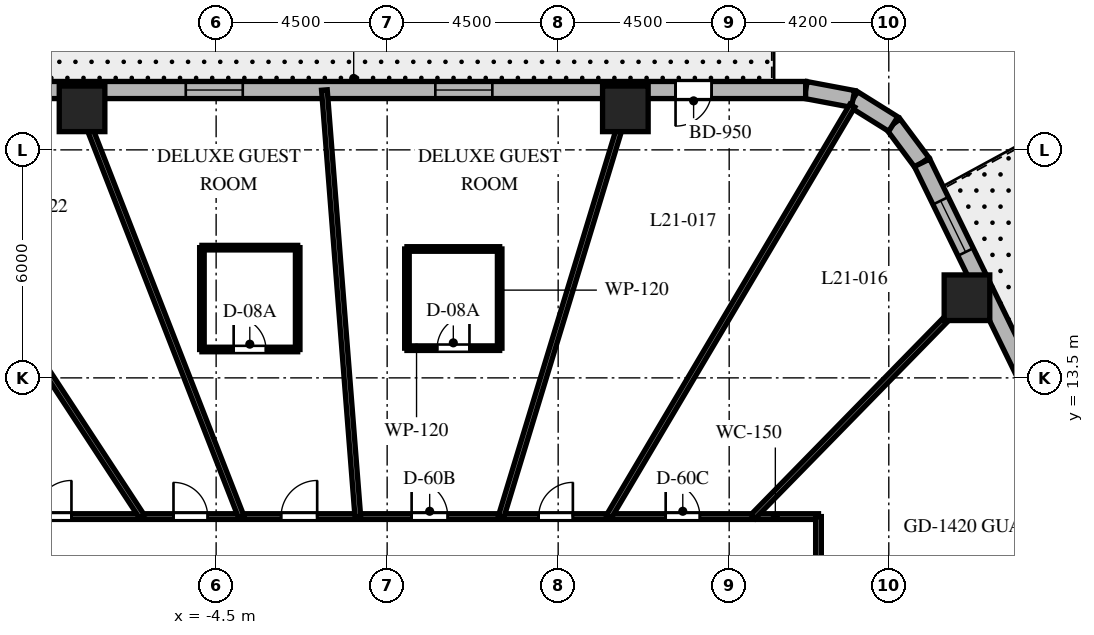
"""IFC4 building model, lengths in metres.
Left out: names, types, materials, properties, quantities, classifications, styles, units other than length and angle.
Written with IfcOpenShell. Run it as: python <this file> out.ifc"""

import sys

from ifc_helpers import new_model, si_unit, direction, frame, frame_2d, origin, origin_2d, place, context, subcontext, project, spatial, rectangle, extrude, element, fill, save


model = new_model("IFC4")
c1 = context("Model", 3, precision=1e-05, world=origin(), true_north=direction((0.0, 1.0)))
c2 = subcontext(c1, "Body", "Model", "MODEL_VIEW")
j1 = project(units=[si_unit("LENGTHUNIT", "METRE"), si_unit("PLANEANGLEUNIT", "RADIAN")], contexts=[c1])
p1 = place(None, origin())
s1 = spatial("IfcSite", under=j1, at=p1, CompositionType="ELEMENT")
p2 = place(p1, origin())
s2 = spatial("IfcBuilding", under=s1, at=p2, CompositionType="ELEMENT")
p3 = place(p2, frame((0.0, 0.0, 91.4)))
s3 = spatial("IfcBuildingStorey", under=s2, at=p3, CompositionType="ELEMENT", Elevation=91.4)
for number, where, z_axis, x_axis in (
    (1, (15.257, 15.609, 0.0), (0.0, 0.0, 1.0), (1.0, 0.0, 0.0)),
    (2, (6.268, 20.58, 0.0), (0.0, 0.0, 1.0), (1.0, 0.0, 0.0)),
    (3, (-8.028, 20.58, 0.0), (0.0, 0.0, 1.0), (1.0, 0.0, 0.0)),
):
    element("IfcColumn", number, at=place(p3, frame(where, z_axis=z_axis, x_axis=x_axis)), inside=s3, PredefinedType="COLUMN", context=c2, shape_type="SweptSolid", body=[
        extrude(rectangle(XDim=1.2, YDim=1.2, at=origin_2d()), origin(), (0.0, 0.0, 1.0), 3.7),
    ])
p4 = place(p3, frame((14.076, 19.161, 0.0), z_axis=(0.0, 0.0, 1.0), x_axis=(-0.597226657159, 0.802072515412, 0.0)))
e4 = element("IfcWall", 4, at=p4, inside=s3, PredefinedType="SOLIDWALL", context=c2, shape_type="SweptSolid", body=[
    extrude(rectangle(XDim=1.269, YDim=0.45, at=frame_2d((0.635, 0.0))), origin(), (0.0, 0.0, 1.0), 3.4),
])
p5 = place(p3, frame((13.318, 20.179, 0.0), z_axis=(0.0, 0.0, 1.0), x_axis=(-0.848031272749, 0.529946186362, 0.0)))
e5 = element("IfcWall", 5, at=p5, inside=s3, PredefinedType="SOLIDWALL", context=c2, shape_type="SweptSolid", body=[
    extrude(rectangle(XDim=1.248, YDim=0.45, at=frame_2d((0.624, 0.0))), origin(), (0.0, 0.0, 1.0), 3.4),
])
p6 = place(p3, frame((12.259, 20.84, 0.0), z_axis=(0.0, 0.0, 1.0), x_axis=(-0.982730354425, 0.185043374624, 0.0)))
e6 = element("IfcWall", 6, at=p6, inside=s3, PredefinedType="SOLIDWALL", context=c2, shape_type="SweptSolid", body=[
    extrude(rectangle(XDim=1.269, YDim=0.45, at=frame_2d((0.635, 0.0))), origin(), (0.0, 0.0, 1.0), 3.4),
])
p7 = place(p3, frame((22.238, 2.427, 0.0), z_axis=(0.0, 0.0, 1.0), x_axis=(-0.438374803278, 0.898792262901, 0.0)))
e7 = element("IfcWall", 7, at=p7, inside=s3, PredefinedType="SOLIDWALL", context=c2, shape_type="SweptSolid", body=[
    extrude(rectangle(XDim=18.618, YDim=0.45, at=frame_2d((9.309, 0.0))), origin(), (0.0, 0.0, 1.0), 3.4),
])
p8 = place(p7, frame((4.62, 0.0, 0.0)))
e8 = element("IfcOpeningElement", 8, at=p8, cuts=e7, PredefinedType="OPENING", context=c2, shape_type="SweptSolid", body=[
    extrude(rectangle(XDim=1.0, YDim=2.15, at=frame_2d((0.5, 1.075))), frame((0.0, 0.235, 0.0), z_axis=(0.0, -1.0, 0.0), x_axis=(1.0, 0.0, 0.0)), (0.0, 0.0, 1.0), 0.47),
])
p9 = place(p7, frame((1.163, 0.0, 0.8)))
e9 = element("IfcOpeningElement", 9, at=p9, cuts=e7, PredefinedType="OPENING", context=c2, shape_type="SweptSolid", body=[
    extrude(rectangle(XDim=1.5, YDim=1.8, at=frame_2d((0.75, 0.9))), frame((0.0, 0.235, 0.0), z_axis=(0.0, -1.0, 0.0), x_axis=(1.0, 0.0, 0.0)), (0.0, 0.0, 1.0), 0.47),
])
p10 = place(p7, frame((8.61, 0.0, 0.8)))
e10 = element("IfcOpeningElement", 10, at=p10, cuts=e7, PredefinedType="OPENING", context=c2, shape_type="SweptSolid", body=[
    extrude(rectangle(XDim=1.5, YDim=1.8, at=frame_2d((0.75, 0.9))), frame((0.0, 0.235, 0.0), z_axis=(0.0, -1.0, 0.0), x_axis=(1.0, 0.0, 0.0)), (0.0, 0.0, 1.0), 0.47),
])
p11 = place(p7, frame((16.006, 0.0, 0.8)))
e11 = element("IfcOpeningElement", 11, at=p11, cuts=e7, PredefinedType="OPENING", context=c2, shape_type="SweptSolid", body=[
    extrude(rectangle(XDim=1.5, YDim=1.8, at=frame_2d((0.75, 0.9))), frame((0.0, 0.235, 0.0), z_axis=(0.0, -1.0, 0.0), x_axis=(1.0, 0.0, 0.0)), (0.0, 0.0, 1.0), 0.47),
])
p12 = place(p3, frame((11.012, 21.075, 0.0), z_axis=(0.0, 0.0, 1.0), x_axis=(-1.0, 0.0, 0.0)))
e12 = element("IfcWall", 12, at=p12, inside=s3, PredefinedType="SOLIDWALL", context=c2, shape_type="SweptSolid", body=[
    extrude(rectangle(XDim=23.782, YDim=0.45, at=frame_2d((11.891, 0.0))), origin(), (0.0, 0.0, 1.0), 3.4),
])
p13 = place(p12, frame((2.473, 0.0, 0.0)))
e13 = element("IfcOpeningElement", 13, at=p13, cuts=e12, PredefinedType="OPENING", context=c2, shape_type="SweptSolid", body=[
    extrude(rectangle(XDim=0.95, YDim=2.15, at=frame_2d((0.475, 1.075))), frame((0.0, 0.235, 0.0), z_axis=(0.0, -1.0, 0.0), x_axis=(1.0, 0.0, 0.0)), (0.0, 0.0, 1.0), 0.47),
])
p14 = place(p12, frame((8.244, 0.0, 0.8)))
e14 = element("IfcOpeningElement", 14, at=p14, cuts=e12, PredefinedType="OPENING", context=c2, shape_type="SweptSolid", body=[
    extrude(rectangle(XDim=1.5, YDim=1.8, at=frame_2d((0.75, 0.9))), frame((0.0, 0.235, 0.0), z_axis=(0.0, -1.0, 0.0), x_axis=(1.0, 0.0, 0.0)), (0.0, 0.0, 1.0), 0.47),
])
p15 = place(p12, frame((14.811, 0.0, 0.8)))
e15 = element("IfcOpeningElement", 15, at=p15, cuts=e12, PredefinedType="OPENING", context=c2, shape_type="SweptSolid", body=[
    extrude(rectangle(XDim=1.5, YDim=1.8, at=frame_2d((0.75, 0.9))), frame((0.0, 0.235, 0.0), z_axis=(0.0, -1.0, 0.0), x_axis=(1.0, 0.0, 0.0)), (0.0, 0.0, 1.0), 0.47),
])
p16 = place(p12, frame((20.741, 0.0, 0.8)))
e16 = element("IfcOpeningElement", 16, at=p16, cuts=e12, PredefinedType="OPENING", context=c2, shape_type="SweptSolid", body=[
    extrude(rectangle(XDim=1.5, YDim=1.8, at=frame_2d((0.75, 0.9))), frame((0.0, 0.235, 0.0), z_axis=(0.0, -1.0, 0.0), x_axis=(1.0, 0.0, 0.0)), (0.0, 0.0, 1.0), 0.47),
])
p17 = place(p3, frame((-11.35, 9.85, 0.0), z_axis=(0.0, 0.0, 1.0), x_axis=(1.0, 0.0, 0.0)))
e17 = element("IfcWall", 17, at=p17, inside=s3, PredefinedType="PARTITIONING", context=c2, shape_type="SweptSolid", body=[
    extrude(rectangle(XDim=22.7, YDim=0.15, at=frame_2d((11.35, 0.0))), origin(), (0.0, 0.0, 1.0), 2.84),
])
p18 = place(p17, frame((18.679, 0.0, 0.0)))
e18 = element("IfcOpeningElement", 18, at=p18, cuts=e17, PredefinedType="OPENING", context=c2, shape_type="SweptSolid", body=[
    extrude(rectangle(XDim=0.9, YDim=2.03, at=frame_2d((0.45, 1.015))), frame((0.0, 0.085, 0.0), z_axis=(0.0, -1.0, 0.0), x_axis=(1.0, 0.0, 0.0)), (0.0, 0.0, 1.0), 0.17),
])
p19 = place(p17, frame((15.337, 0.0, 0.0)))
e19 = element("IfcOpeningElement", 19, at=p19, cuts=e17, PredefinedType="OPENING", context=c2, shape_type="SweptSolid", body=[
    extrude(rectangle(XDim=0.9, YDim=2.03, at=frame_2d((0.45, 1.015))), frame((0.0, 0.085, 0.0), z_axis=(0.0, -1.0, 0.0), x_axis=(1.0, 0.0, 0.0)), (0.0, 0.0, 1.0), 0.17),
])
p20 = place(p17, frame((11.994, 0.0, 0.0)))
e20 = element("IfcOpeningElement", 20, at=p20, cuts=e17, PredefinedType="OPENING", context=c2, shape_type="SweptSolid", body=[
    extrude(rectangle(XDim=0.95, YDim=2.03, at=frame_2d((0.475, 1.015))), frame((0.0, 0.085, 0.0), z_axis=(0.0, -1.0, 0.0), x_axis=(1.0, 0.0, 0.0)), (0.0, 0.0, 1.0), 0.17),
])
p21 = place(p17, frame((8.559, 0.0, 0.0)))
e21 = element("IfcOpeningElement", 21, at=p21, cuts=e17, PredefinedType="OPENING", context=c2, shape_type="SweptSolid", body=[
    extrude(rectangle(XDim=0.95, YDim=2.03, at=frame_2d((0.475, 1.015))), frame((0.0, 0.085, 0.0), z_axis=(0.0, -1.0, 0.0), x_axis=(1.0, 0.0, 0.0)), (0.0, 0.0, 1.0), 0.17),
])
p22 = place(p17, frame((5.728, 0.0, 0.0)))
e22 = element("IfcOpeningElement", 22, at=p22, cuts=e17, PredefinedType="OPENING", context=c2, shape_type="SweptSolid", body=[
    extrude(rectangle(XDim=0.9, YDim=2.03, at=frame_2d((0.45, 1.015))), frame((0.0, 0.085, 0.0), z_axis=(0.0, -1.0, 0.0), x_axis=(1.0, 0.0, 0.0)), (0.0, 0.0, 1.0), 0.17),
])
p23 = place(p17, frame((2.093, 0.0, 0.0)))
e23 = element("IfcOpeningElement", 23, at=p23, cuts=e17, PredefinedType="OPENING", context=c2, shape_type="SweptSolid", body=[
    extrude(rectangle(XDim=0.95, YDim=2.03, at=frame_2d((0.475, 1.015))), frame((0.0, 0.085, 0.0), z_axis=(0.0, -1.0, 0.0), x_axis=(1.0, 0.0, 0.0)), (0.0, 0.0, 1.0), 0.17),
])
p24 = place(p3, frame((11.35, 9.85, 0.0), z_axis=(0.0, 0.0, 1.0), x_axis=(0.0, -1.0, 0.0)))
e24 = element("IfcWall", 24, at=p24, inside=s3, PredefinedType="PARTITIONING", context=c2, shape_type="SweptSolid", body=[
    extrude(rectangle(XDim=19.7, YDim=0.15, at=frame_2d((9.85, 0.0))), origin(), (0.0, 0.0, 1.0), 2.84),
])
p25 = place(p24, frame((7.426, 0.0, 0.0)))
e25 = element("IfcOpeningElement", 25, at=p25, cuts=e24, PredefinedType="OPENING", context=c2, shape_type="SweptSolid", body=[
    extrude(rectangle(XDim=0.9, YDim=2.03, at=frame_2d((0.45, 1.015))), frame((0.0, 0.085, 0.0), z_axis=(0.0, -1.0, 0.0), x_axis=(1.0, 0.0, 0.0)), (0.0, 0.0, 1.0), 0.17),
])
p26 = place(p24, frame((3.008, 0.0, 0.0)))
e26 = element("IfcOpeningElement", 26, at=p26, cuts=e24, PredefinedType="OPENING", context=c2, shape_type="SweptSolid", body=[
    extrude(rectangle(XDim=0.95, YDim=2.03, at=frame_2d((0.475, 1.015))), frame((0.0, 0.085, 0.0), z_axis=(0.0, -1.0, 0.0), x_axis=(1.0, 0.0, 0.0)), (0.0, 0.0, 1.0), 0.17),
])
p27 = place(p24, frame((16.938, 0.0, 0.0)))
e27 = element("IfcOpeningElement", 27, at=p27, cuts=e24, PredefinedType="OPENING", context=c2, shape_type="SweptSolid", body=[
    extrude(rectangle(XDim=0.95, YDim=2.03, at=frame_2d((0.475, 1.015))), frame((0.0, 0.085, 0.0), z_axis=(0.0, -1.0, 0.0), x_axis=(1.0, 0.0, 0.0)), (0.0, 0.0, 1.0), 0.17),
])
p28 = place(p24, frame((13.171, 0.0, 0.0)))
e28 = element("IfcOpeningElement", 28, at=p28, cuts=e24, PredefinedType="OPENING", context=c2, shape_type="SweptSolid", body=[
    extrude(rectangle(XDim=0.95, YDim=2.03, at=frame_2d((0.475, 1.015))), frame((0.0, 0.085, 0.0), z_axis=(0.0, -1.0, 0.0), x_axis=(1.0, 0.0, 0.0)), (0.0, 0.0, 1.0), 0.17),
])
p29 = place(p24, frame((9.994, 0.0, 0.0)))
e29 = element("IfcOpeningElement", 29, at=p29, cuts=e24, PredefinedType="OPENING", context=c2, shape_type="SweptSolid", body=[
    extrude(rectangle(XDim=0.95, YDim=2.03, at=frame_2d((0.475, 1.015))), frame((0.0, 0.085, 0.0), z_axis=(0.0, -1.0, 0.0), x_axis=(1.0, 0.0, 0.0)), (0.0, 0.0, 1.0), 0.17),
])
p30 = place(p3, frame((9.628, 9.85, 0.0), z_axis=(0.0, 0.0, 1.0), x_axis=(0.698992824326, 0.715128681805, 0.0)))
e30 = element("IfcWall", 30, at=p30, inside=s3, PredefinedType="PARTITIONING", context=c2, shape_type="SweptSolid", body=[
    extrude(rectangle(XDim=8.579, YDim=0.15, at=frame_2d((4.29, 0.0))), origin(), (0.0, 0.0, 1.0), 2.54),
])
p31 = place(p3, frame((5.835, 9.85, 0.0), z_axis=(0.0, 0.0, 1.0), x_axis=(0.509682574642, 0.860362524234, 0.0)))
e31 = element("IfcWall", 31, at=p31, inside=s3, PredefinedType="PARTITIONING", context=c2, shape_type="SweptSolid", body=[
    extrude(rectangle(XDim=12.568, YDim=0.15, at=frame_2d((6.284, 0.0))), origin(), (0.0, 0.0, 1.0), 2.54),
])
p32 = place(p3, frame((3.0, 9.85, 0.0), z_axis=(0.0, 0.0, 1.0), x_axis=(0.291352035382, 0.95661590593, 0.0)))
e32 = element("IfcWall", 32, at=p32, inside=s3, PredefinedType="PARTITIONING", context=c2, shape_type="SweptSolid", body=[
    extrude(rectangle(XDim=11.734, YDim=0.15, at=frame_2d((5.867, 0.0))), origin(), (0.0, 0.0, 1.0), 2.54),
])
p33 = place(p3, frame((-0.772, 9.85, 0.0), z_axis=(0.0, 0.0, 1.0), x_axis=(-0.078125747145, 0.996943512759, 0.0)))
e33 = element("IfcWall", 33, at=p33, inside=s3, PredefinedType="PARTITIONING", context=c2, shape_type="SweptSolid", body=[
    extrude(rectangle(XDim=11.259, YDim=0.15, at=frame_2d((5.63, 0.0))), origin(), (0.0, 0.0, 1.0), 2.54),
])
p34 = place(p3, frame((-3.842, 9.85, 0.0), z_axis=(0.0, 0.0, 1.0), x_axis=(-0.363432685593, 0.931620460833, 0.0)))
e34 = element("IfcWall", 34, at=p34, inside=s3, PredefinedType="PARTITIONING", context=c2, shape_type="SweptSolid", body=[
    extrude(rectangle(XDim=12.049, YDim=0.15, at=frame_2d((6.024, 0.0))), origin(), (0.0, 0.0, 1.0), 2.54),
])
p35 = place(p3, frame((-6.454, 9.85, 0.0), z_axis=(0.0, 0.0, 1.0), x_axis=(-0.548052950111, 0.836443640584, 0.0)))
e35 = element("IfcWall", 35, at=p35, inside=s3, PredefinedType="PARTITIONING", context=c2, shape_type="SweptSolid", body=[
    extrude(rectangle(XDim=13.019, YDim=0.15, at=frame_2d((6.51, 0.0))), origin(), (0.0, 0.0, 1.0), 2.54),
])
p36 = place(p3, frame((0.521, 14.282, 0.0), z_axis=(0.0, 0.0, 1.0), x_axis=(1.0, 0.0, 0.0)))
e36 = element("IfcWall", 36, at=p36, inside=s3, PredefinedType="PARTITIONING", context=c2, shape_type="SweptSolid", body=[
    extrude(rectangle(XDim=2.44, YDim=0.12, at=frame_2d((1.22, 0.0))), origin(), (0.0, 0.0, 1.0), 3.4),
])
p37 = place(p36, frame((0.795, 0.0, 0.0)))
e37 = element("IfcOpeningElement", 37, at=p37, cuts=e36, PredefinedType="OPENING", context=c2, shape_type="SweptSolid", body=[
    extrude(rectangle(XDim=0.85, YDim=2.03, at=frame_2d((0.425, 1.015))), frame((0.0, 0.07, 0.0), z_axis=(0.0, -1.0, 0.0), x_axis=(1.0, 0.0, 0.0)), (0.0, 0.0, 1.0), 0.14),
])
p38 = place(p3, frame((2.961, 14.282, 0.0), z_axis=(0.0, 0.0, 1.0), x_axis=(0.0, 1.0, 0.0)))
e38 = element("IfcWall", 38, at=p38, inside=s3, PredefinedType="PARTITIONING", context=c2, shape_type="SweptSolid", body=[
    extrude(rectangle(XDim=2.61, YDim=0.12, at=frame_2d((1.305, 0.0))), origin(), (0.0, 0.0, 1.0), 2.841),
])
p39 = place(p3, frame((2.961, 16.892, 0.0), z_axis=(0.0, 0.0, 1.0), x_axis=(-1.0, 0.0, 0.0)))
e39 = element("IfcWall", 39, at=p39, inside=s3, PredefinedType="PARTITIONING", context=c2, shape_type="SweptSolid", body=[
    extrude(rectangle(XDim=2.44, YDim=0.12, at=frame_2d((1.22, 0.0))), origin(), (0.0, 0.0, 1.0), 3.4),
])
p40 = place(p3, frame((0.521, 16.892, 0.0), z_axis=(0.0, 0.0, 1.0), x_axis=(0.0, -1.0, 0.0)))
e40 = element("IfcWall", 40, at=p40, inside=s3, PredefinedType="PARTITIONING", context=c2, shape_type="SweptSolid", body=[
    extrude(rectangle(XDim=2.61, YDim=0.12, at=frame_2d((1.305, 0.0))), origin(), (0.0, 0.0, 1.0), 2.841),
])
p41 = place(p3, frame((-4.874, 14.247, 0.0), z_axis=(0.0, 0.0, 1.0), x_axis=(1.0, 0.0, 0.0)))
e41 = element("IfcWall", 41, at=p41, inside=s3, PredefinedType="PARTITIONING", context=c2, shape_type="SweptSolid", body=[
    extrude(rectangle(XDim=2.52, YDim=0.12, at=frame_2d((1.26, 0.0))), origin(), (0.0, 0.0, 1.0), 3.4),
])
p42 = place(p41, frame((0.835, 0.0, 0.0)))
e42 = element("IfcOpeningElement", 42, at=p42, cuts=e41, PredefinedType="OPENING", context=c2, shape_type="SweptSolid", body=[
    extrude(rectangle(XDim=0.85, YDim=2.03, at=frame_2d((0.425, 1.015))), frame((0.0, 0.07, 0.0), z_axis=(0.0, -1.0, 0.0), x_axis=(1.0, 0.0, 0.0)), (0.0, 0.0, 1.0), 0.14),
])
p43 = place(p3, frame((-2.354, 14.247, 0.0), z_axis=(0.0, 0.0, 1.0), x_axis=(0.0, 1.0, 0.0)))
e43 = element("IfcWall", 43, at=p43, inside=s3, PredefinedType="PARTITIONING", context=c2, shape_type="SweptSolid", body=[
    extrude(rectangle(XDim=2.68, YDim=0.12, at=frame_2d((1.34, 0.0))), origin(), (0.0, 0.0, 1.0), 2.841),
])
p44 = place(p3, frame((-2.354, 16.927, 0.0), z_axis=(0.0, 0.0, 1.0), x_axis=(-1.0, 0.0, 0.0)))
e44 = element("IfcWall", 44, at=p44, inside=s3, PredefinedType="PARTITIONING", context=c2, shape_type="SweptSolid", body=[
    extrude(rectangle(XDim=2.52, YDim=0.12, at=frame_2d((1.26, 0.0))), origin(), (0.0, 0.0, 1.0), 3.4),
])
p45 = place(p3, frame((-4.874, 16.927, 0.0), z_axis=(0.0, 0.0, 1.0), x_axis=(0.0, -1.0, 0.0)))
e45 = element("IfcWall", 45, at=p45, inside=s3, PredefinedType="PARTITIONING", context=c2, shape_type="SweptSolid", body=[
    extrude(rectangle(XDim=2.68, YDim=0.12, at=frame_2d((1.34, 0.0))), origin(), (0.0, 0.0, 1.0), 2.841),
])
p46 = place(p11, origin())
e46 = element("IfcWindow", 46, at=p46, inside=s3, PartitioningType="SINGLE_PANEL", PredefinedType="WINDOW", context=c2, shape_type="SweptSolid", body=[
    extrude(rectangle(XDim=1.5, YDim=1.8, at=frame_2d((0.75, 0.9))), frame((0.0, 0.03, 0.0), z_axis=(0.0, -1.0, 0.0), x_axis=(1.0, 0.0, 0.0)), (0.0, 0.0, 1.0), 0.06),
])
fill(e11, e46)
p47 = place(p13, origin())
e47 = element("IfcDoor", 47, at=p47, inside=s3, OperationType="SINGLE_SWING_RIGHT", PredefinedType="DOOR", context=c2, shape_type="SweptSolid", body=[
    extrude(rectangle(XDim=0.95, YDim=2.15, at=frame_2d((0.475, 1.075))), frame((0.0, 0.025, 0.0), z_axis=(0.0, -1.0, 0.0), x_axis=(1.0, 0.0, 0.0)), (0.0, 0.0, 1.0), 0.05),
])
fill(e13, e47)
p48 = place(p14, origin())
e48 = element("IfcWindow", 48, at=p48, inside=s3, PartitioningType="SINGLE_PANEL", PredefinedType="WINDOW", context=c2, shape_type="SweptSolid", body=[
    extrude(rectangle(XDim=1.5, YDim=1.8, at=frame_2d((0.75, 0.9))), frame((0.0, 0.03, 0.0), z_axis=(0.0, -1.0, 0.0), x_axis=(1.0, 0.0, 0.0)), (0.0, 0.0, 1.0), 0.06),
])
fill(e14, e48)
p49 = place(p15, origin())
e49 = element("IfcWindow", 49, at=p49, inside=s3, PartitioningType="SINGLE_PANEL", PredefinedType="WINDOW", context=c2, shape_type="SweptSolid", body=[
    extrude(rectangle(XDim=1.5, YDim=1.8, at=frame_2d((0.75, 0.9))), frame((0.0, 0.03, 0.0), z_axis=(0.0, -1.0, 0.0), x_axis=(1.0, 0.0, 0.0)), (0.0, 0.0, 1.0), 0.06),
])
fill(e15, e49)
p50 = place(p18, origin())
e50 = element("IfcDoor", 50, at=p50, inside=s3, OperationType="SINGLE_SWING_LEFT", PredefinedType="DOOR", context=c2, shape_type="SweptSolid", body=[
    extrude(rectangle(XDim=0.9, YDim=2.03, at=frame_2d((0.45, 1.015))), frame((0.0, 0.025, 0.0), z_axis=(0.0, -1.0, 0.0), x_axis=(1.0, 0.0, 0.0)), (0.0, 0.0, 1.0), 0.05),
])
fill(e18, e50)
p51 = place(p19, origin())
e51 = element("IfcDoor", 51, at=p51, inside=s3, OperationType="SINGLE_SWING_RIGHT", PredefinedType="DOOR", context=c2, shape_type="SweptSolid", body=[
    extrude(rectangle(XDim=0.9, YDim=2.03, at=frame_2d((0.45, 1.015))), frame((0.0, 0.025, 0.0), z_axis=(0.0, -1.0, 0.0), x_axis=(1.0, 0.0, 0.0)), (0.0, 0.0, 1.0), 0.05),
])
fill(e19, e51)
p52 = place(p20, origin())
e52 = element("IfcDoor", 52, at=p52, inside=s3, OperationType="SINGLE_SWING_LEFT", PredefinedType="DOOR", context=c2, shape_type="SweptSolid", body=[
    extrude(rectangle(XDim=0.95, YDim=2.03, at=frame_2d((0.475, 1.015))), frame((0.0, 0.025, 0.0), z_axis=(0.0, -1.0, 0.0), x_axis=(1.0, 0.0, 0.0)), (0.0, 0.0, 1.0), 0.05),
])
fill(e20, e52)
p53 = place(p37, origin())
e53 = element("IfcDoor", 53, at=p53, inside=s3, OperationType="SINGLE_SWING_RIGHT", PredefinedType="DOOR", context=c2, shape_type="SweptSolid", body=[
    extrude(rectangle(XDim=0.85, YDim=2.03, at=frame_2d((0.425, 1.015))), frame((0.0, 0.025, 0.0), z_axis=(0.0, -1.0, 0.0), x_axis=(1.0, 0.0, 0.0)), (0.0, 0.0, 1.0), 0.05),
])
fill(e37, e53)
p54 = place(p21, origin())
e54 = element("IfcDoor", 54, at=p54, inside=s3, OperationType="SINGLE_SWING_RIGHT", PredefinedType="DOOR", context=c2, shape_type="SweptSolid", body=[
    extrude(rectangle(XDim=0.95, YDim=2.03, at=frame_2d((0.475, 1.015))), frame((0.0, 0.025, 0.0), z_axis=(0.0, -1.0, 0.0), x_axis=(1.0, 0.0, 0.0)), (0.0, 0.0, 1.0), 0.05),
])
fill(e21, e54)
p55 = place(p42, origin())
e55 = element("IfcDoor", 55, at=p55, inside=s3, OperationType="SINGLE_SWING_LEFT", PredefinedType="DOOR", context=c2, shape_type="SweptSolid", body=[
    extrude(rectangle(XDim=0.85, YDim=2.03, at=frame_2d((0.425, 1.015))), frame((0.0, 0.025, 0.0), z_axis=(0.0, -1.0, 0.0), x_axis=(1.0, 0.0, 0.0)), (0.0, 0.0, 1.0), 0.05),
])
fill(e42, e55)
p56 = place(p22, origin())
e56 = element("IfcDoor", 56, at=p56, inside=s3, OperationType="SINGLE_SWING_LEFT", PredefinedType="DOOR", context=c2, shape_type="SweptSolid", body=[
    extrude(rectangle(XDim=0.9, YDim=2.03, at=frame_2d((0.45, 1.015))), frame((0.0, 0.025, 0.0), z_axis=(0.0, -1.0, 0.0), x_axis=(1.0, 0.0, 0.0)), (0.0, 0.0, 1.0), 0.05),
])
fill(e22, e56)
p57 = place(p23, origin())
e57 = element("IfcDoor", 57, at=p57, inside=s3, OperationType="SINGLE_SWING_RIGHT", PredefinedType="DOOR", context=c2, shape_type="SweptSolid", body=[
    extrude(rectangle(XDim=0.95, YDim=2.03, at=frame_2d((0.475, 1.015))), frame((0.0, 0.025, 0.0), z_axis=(0.0, -1.0, 0.0), x_axis=(1.0, 0.0, 0.0)), (0.0, 0.0, 1.0), 0.05),
])
fill(e23, e57)
save(model, sys.argv[1])
